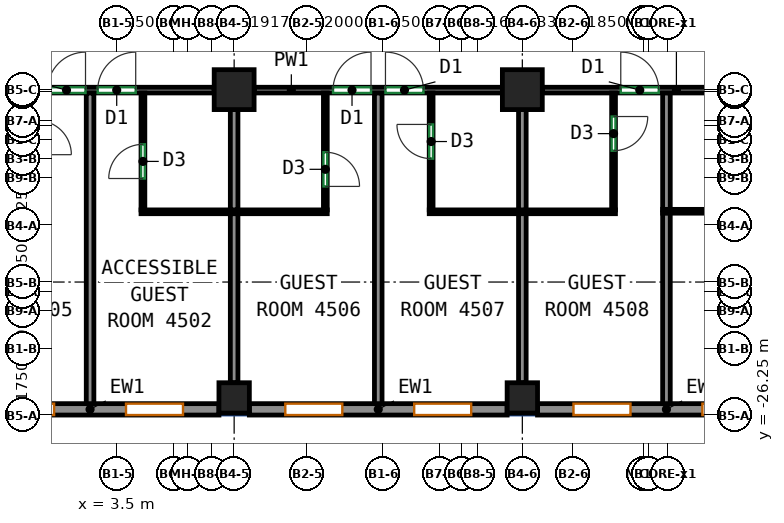
"""IFC4 building model, lengths in metres.
Left out: names, types, materials, properties, quantities, classifications, styles, units other than length and angle.
Written with IfcOpenShell. Run it as: python <this file> out.ifc"""

import sys

from ifc_helpers import new_model, si_unit, direction, frame, frame_2d, origin, origin_2d, place, context, subcontext, project, spatial, rectangle, extrude, source, transform, mapped, element, fill, save


model = new_model("IFC4")
c1 = context("Model", 3, precision=1e-05, world=origin(), true_north=direction((0.0, 1.0)))
c2 = subcontext(c1, "Body", "Model", "MODEL_VIEW")
j1 = project(units=[si_unit("LENGTHUNIT", "METRE"), si_unit("PLANEANGLEUNIT", "RADIAN")], contexts=[c1])
p1 = place(None, origin())
s1 = spatial("IfcSite", under=j1, at=p1, CompositionType="ELEMENT")
p2 = place(p1, origin())
s2 = spatial("IfcBuilding", under=s1, at=p2, CompositionType="ELEMENT")
p3 = place(p2, frame((0.0, 0.0, 188.9)))
s3 = spatial("IfcBuildingStorey", under=s2, at=p3, CompositionType="ELEMENT", Elevation=188.9)
m1 = source(origin(), c2, "Body", "SweptSolid", [
    extrude(rectangle(XDim=0.8, YDim=0.8, at=origin_2d()), origin(), (0.0, 0.0, 1.0), 3.12),
])
p4 = place(p3, frame((6.583, -25.8, 0.0), z_axis=(0.0, 0.0, 1.0), x_axis=(1.0, 0.0, 0.0)))
e1 = element("IfcColumn", 1, at=p4, inside=s3, PredefinedType="COLUMN", context=c2, shape_type="MappedRepresentation", body=[
    mapped(m1, transform((0.0, 0.0, 0.0))),
])
m2 = source(origin(), c2, "Body", "SweptSolid", [
    extrude(rectangle(XDim=1.05, YDim=1.05, at=origin_2d()), origin(), (0.0, 0.0, 1.0), 3.12),
])
p5 = place(p3, frame((6.583, -17.688, 0.0), z_axis=(0.0, 0.0, 1.0), x_axis=(1.0, 0.0, 0.0)))
e2 = element("IfcColumn", 2, at=p5, inside=s3, PredefinedType="COLUMN", context=c2, shape_type="MappedRepresentation", body=[
    mapped(m2, transform((0.0, 0.0, 0.0))),
])
p6 = place(p3, frame((14.167, -25.8, 0.0), z_axis=(0.0, 0.0, 1.0), x_axis=(1.0, 0.0, 0.0)))
e3 = element("IfcColumn", 3, at=p6, inside=s3, PredefinedType="COLUMN", context=c2, shape_type="MappedRepresentation", body=[
    mapped(m1, transform((0.0, 0.0, 0.0))),
])
p7 = place(p3, frame((14.167, -17.688, 0.0), z_axis=(0.0, 0.0, 1.0), x_axis=(1.0, 0.0, 0.0)))
e4 = element("IfcColumn", 4, at=p7, inside=s3, PredefinedType="COLUMN", context=c2, shape_type="MappedRepresentation", body=[
    mapped(m2, transform((0.0, 0.0, 0.0))),
])
m3 = source(origin(), c2, "Body", "SweptSolid", [
    extrude(rectangle(XDim=6.783, YDim=0.3, at=frame_2d((3.392, 0.0))), origin(), (0.0, 0.0, 1.0), 3.12),
])
p8 = place(p3, frame((-0.6, -26.1, 0.0), z_axis=(0.0, 0.0, 1.0), x_axis=(1.0, 0.0, 0.0)))
e5 = element("IfcWall", 5, at=p8, inside=s3, PredefinedType="SOLIDWALL", context=c2, shape_type="MappedRepresentation", body=[
    mapped(m3, transform((0.0, 0.0, 0.0))),
])
p9 = place(p8, frame((0.946, 0.0, 0.85)))
e6 = element("IfcOpeningElement", 6, at=p9, cuts=e5, PredefinedType="OPENING", context=c2, shape_type="SweptSolid", body=[
    extrude(rectangle(XDim=1.5, YDim=1.95, at=frame_2d((0.75, 0.975))), frame((0.0, 0.16, 0.0), z_axis=(0.0, -1.0, 0.0), x_axis=(1.0, 0.0, 0.0)), (0.0, 0.0, 1.0), 0.32),
])
p10 = place(p8, frame((4.337, 0.0, 0.85)))
e7 = element("IfcOpeningElement", 7, at=p10, cuts=e5, PredefinedType="OPENING", context=c2, shape_type="SweptSolid", body=[
    extrude(rectangle(XDim=1.5, YDim=1.95, at=frame_2d((0.75, 0.975))), frame((0.0, 0.16, 0.0), z_axis=(0.0, -1.0, 0.0), x_axis=(1.0, 0.0, 0.0)), (0.0, 0.0, 1.0), 0.32),
])
m4 = source(origin(), c2, "Body", "SweptSolid", [
    extrude(rectangle(XDim=6.783, YDim=0.3, at=frame_2d((3.392, 0.0))), origin(), (0.0, 0.0, 1.0), 3.12),
])
p11 = place(p3, frame((6.983, -26.1, 0.0), z_axis=(0.0, 0.0, 1.0), x_axis=(1.0, 0.0, 0.0)))
e8 = element("IfcWall", 8, at=p11, inside=s3, PredefinedType="SOLIDWALL", context=c2, shape_type="MappedRepresentation", body=[
    mapped(m4, transform((0.0, 0.0, 0.0))),
])
p12 = place(p11, frame((0.946, 0.0, 0.85)))
e9 = element("IfcOpeningElement", 9, at=p12, cuts=e8, PredefinedType="OPENING", context=c2, shape_type="SweptSolid", body=[
    extrude(rectangle(XDim=1.5, YDim=1.95, at=frame_2d((0.75, 0.975))), frame((0.0, 0.16, 0.0), z_axis=(0.0, -1.0, 0.0), x_axis=(1.0, 0.0, 0.0)), (0.0, 0.0, 1.0), 0.32),
])
p13 = place(p11, frame((4.338, 0.0, 0.85)))
e10 = element("IfcOpeningElement", 10, at=p13, cuts=e8, PredefinedType="OPENING", context=c2, shape_type="SweptSolid", body=[
    extrude(rectangle(XDim=1.5, YDim=1.95, at=frame_2d((0.75, 0.975))), frame((0.0, 0.16, 0.0), z_axis=(0.0, -1.0, 0.0), x_axis=(1.0, 0.0, 0.0)), (0.0, 0.0, 1.0), 0.32),
])
p14 = place(p3, frame((14.567, -26.1, 0.0), z_axis=(0.0, 0.0, 1.0), x_axis=(1.0, 0.0, 0.0)))
e11 = element("IfcWall", 11, at=p14, inside=s3, PredefinedType="SOLIDWALL", context=c2, shape_type="MappedRepresentation", body=[
    mapped(m3, transform((0.0, 0.0, 0.0))),
])
p15 = place(p14, frame((0.946, 0.0, 0.85)))
e12 = element("IfcOpeningElement", 12, at=p15, cuts=e11, PredefinedType="OPENING", context=c2, shape_type="SweptSolid", body=[
    extrude(rectangle(XDim=1.5, YDim=1.95, at=frame_2d((0.75, 0.975))), frame((0.0, 0.16, 0.0), z_axis=(0.0, -1.0, 0.0), x_axis=(1.0, 0.0, 0.0)), (0.0, 0.0, 1.0), 0.32),
])
p16 = place(p14, frame((4.337, 0.0, 0.85)))
e13 = element("IfcOpeningElement", 13, at=p16, cuts=e11, PredefinedType="OPENING", context=c2, shape_type="SweptSolid", body=[
    extrude(rectangle(XDim=1.5, YDim=1.95, at=frame_2d((0.75, 0.975))), frame((0.0, 0.16, 0.0), z_axis=(0.0, -1.0, 0.0), x_axis=(1.0, 0.0, 0.0)), (0.0, 0.0, 1.0), 0.32),
])
p17 = place(p3, frame((-0.475, -17.7, 0.0), z_axis=(0.0, 0.0, 1.0), x_axis=(1.0, 0.0, 0.0)))
e14 = element("IfcWall", 14, at=p17, inside=s3, PredefinedType="PARTITIONING", context=c2, shape_type="SweptSolid", body=[
    extrude(rectangle(XDim=6.533, YDim=0.15, at=frame_2d((3.267, 0.0))), origin(), (0.0, 0.0, 1.0), 3.12),
])
p18 = place(p17, frame((2.147, 0.0, 0.0)))
e15 = element("IfcOpeningElement", 15, at=p18, cuts=e14, PredefinedType="OPENING", context=c2, shape_type="SweptSolid", body=[
    extrude(rectangle(XDim=1.0, YDim=2.1, at=frame_2d((0.5, 1.05))), frame((0.0, 0.085, 0.0), z_axis=(0.0, -1.0, 0.0), x_axis=(1.0, 0.0, 0.0)), (0.0, 0.0, 1.0), 0.17),
])
p19 = place(p17, frame((3.468, 0.0, 0.0)))
e16 = element("IfcOpeningElement", 16, at=p19, cuts=e14, PredefinedType="OPENING", context=c2, shape_type="SweptSolid", body=[
    extrude(rectangle(XDim=1.0, YDim=2.1, at=frame_2d((0.5, 1.05))), frame((0.0, 0.085, 0.0), z_axis=(0.0, -1.0, 0.0), x_axis=(1.0, 0.0, 0.0)), (0.0, 0.0, 1.0), 0.17),
])
p20 = place(p3, frame((7.108, -17.7, 0.0), z_axis=(0.0, 0.0, 1.0), x_axis=(1.0, 0.0, 0.0)))
e17 = element("IfcWall", 17, at=p20, inside=s3, PredefinedType="PARTITIONING", context=c2, shape_type="SweptSolid", body=[
    extrude(rectangle(XDim=6.534, YDim=0.15, at=frame_2d((3.267, 0.0))), origin(), (0.0, 0.0, 1.0), 3.12),
])
p21 = place(p20, frame((2.077, 0.0, 0.0)))
e18 = element("IfcOpeningElement", 18, at=p21, cuts=e17, PredefinedType="OPENING", context=c2, shape_type="SweptSolid", body=[
    extrude(rectangle(XDim=1.0, YDim=2.1, at=frame_2d((0.5, 1.05))), frame((0.0, 0.085, 0.0), z_axis=(0.0, -1.0, 0.0), x_axis=(1.0, 0.0, 0.0)), (0.0, 0.0, 1.0), 0.17),
])
p22 = place(p20, frame((3.457, 0.0, 0.0)))
e19 = element("IfcOpeningElement", 19, at=p22, cuts=e17, PredefinedType="OPENING", context=c2, shape_type="SweptSolid", body=[
    extrude(rectangle(XDim=1.0, YDim=2.1, at=frame_2d((0.5, 1.05))), frame((0.0, 0.085, 0.0), z_axis=(0.0, -1.0, 0.0), x_axis=(1.0, 0.0, 0.0)), (0.0, 0.0, 1.0), 0.17),
])
p23 = place(p3, frame((14.692, -17.7, 0.0), z_axis=(0.0, 0.0, 1.0), x_axis=(1.0, 0.0, 0.0)))
e20 = element("IfcWall", 20, at=p23, inside=s3, PredefinedType="PARTITIONING", context=c2, shape_type="SweptSolid", body=[
    extrude(rectangle(XDim=7.058, YDim=0.15, at=frame_2d((3.529, 0.0))), origin(), (0.0, 0.0, 1.0), 2.52),
])
p24 = place(p23, frame((2.065, 0.0, 0.0)))
e21 = element("IfcOpeningElement", 21, at=p24, cuts=e20, PredefinedType="OPENING", context=c2, shape_type="SweptSolid", body=[
    extrude(rectangle(XDim=1.0, YDim=2.1, at=frame_2d((0.5, 1.05))), frame((0.0, 0.085, 0.0), z_axis=(0.0, -1.0, 0.0), x_axis=(1.0, 0.0, 0.0)), (0.0, 0.0, 1.0), 0.17),
])
p25 = place(p23, frame((5.858, 0.0, 0.0)))
e22 = element("IfcOpeningElement", 22, at=p25, cuts=e20, PredefinedType="OPENING", context=c2, shape_type="SweptSolid", body=[
    extrude(rectangle(XDim=1.0, YDim=2.1, at=frame_2d((0.5, 1.05))), frame((0.0, 0.085, 0.0), z_axis=(0.0, -1.0, 0.0), x_axis=(1.0, 0.0, 0.0)), (0.0, 0.0, 1.0), 0.17),
])
p26 = place(p3, frame((2.792, -26.0, 0.0), z_axis=(0.0, 0.0, 1.0), x_axis=(0.0, 1.0, 0.0)))
e23 = element("IfcWall", 23, at=p26, inside=s3, PredefinedType="PARTITIONING", context=c2, shape_type="SweptSolid", body=[
    extrude(rectangle(XDim=8.223, YDim=0.2, at=frame_2d((4.111, 0.0))), origin(), (0.0, 0.0, 1.0), 3.12),
])
p27 = place(p3, frame((4.183, -20.852, 0.0), z_axis=(0.0, 0.0, 1.0), x_axis=(0.0, 1.0, 0.0)))
e24 = element("IfcWall", 24, at=p27, inside=s3, PredefinedType="PARTITIONING", context=c2, shape_type="SweptSolid", body=[
    extrude(rectangle(XDim=3.075, YDim=0.1, at=frame_2d((1.538, 0.0))), origin(), (0.0, 0.0, 1.0), 3.12),
])
p28 = place(p27, frame((0.826, 0.0, 0.0)))
e25 = element("IfcOpeningElement", 25, at=p28, cuts=e24, PredefinedType="OPENING", context=c2, shape_type="SweptSolid", body=[
    extrude(rectangle(XDim=0.9, YDim=2.1, at=frame_2d((0.45, 1.05))), frame((0.0, 0.06, 0.0), z_axis=(0.0, -1.0, 0.0), x_axis=(1.0, 0.0, 0.0)), (0.0, 0.0, 1.0), 0.12),
])
p29 = place(p3, frame((4.133, -20.902, 0.0), z_axis=(0.0, 0.0, 1.0), x_axis=(1.0, 0.0, 0.0)))
e26 = element("IfcWall", 26, at=p29, inside=s3, PredefinedType="PARTITIONING", context=c2, shape_type="SweptSolid", body=[
    extrude(rectangle(XDim=4.9, YDim=0.1, at=frame_2d((2.45, 0.0))), origin(), (0.0, 0.0, 1.0), 3.12),
])
p30 = place(p3, frame((6.583, -25.4, 0.0), z_axis=(0.0, 0.0, 1.0), x_axis=(0.0, 1.0, 0.0)))
e27 = element("IfcWall", 27, at=p30, inside=s3, PredefinedType="PARTITIONING", context=c2, shape_type="SweptSolid", body=[
    extrude(rectangle(XDim=4.448, YDim=0.2, at=frame_2d((2.224, 0.0))), origin(), (0.0, 0.0, 1.0), 3.12),
])
p31 = place(p3, frame((6.583, -20.852, 0.0), z_axis=(0.0, 0.0, 1.0), x_axis=(0.0, 1.0, 0.0)))
e28 = element("IfcWall", 28, at=p31, inside=s3, PredefinedType="PARTITIONING", context=c2, shape_type="SweptSolid", body=[
    extrude(rectangle(XDim=2.64, YDim=0.2, at=frame_2d((1.32, 0.0))), origin(), (0.0, 0.0, 1.0), 3.12),
])
p32 = place(p3, frame((8.983, -17.777, 0.0), z_axis=(0.0, 0.0, 1.0), x_axis=(0.0, -1.0, 0.0)))
e29 = element("IfcWall", 29, at=p32, inside=s3, PredefinedType="PARTITIONING", context=c2, shape_type="SweptSolid", body=[
    extrude(rectangle(XDim=3.075, YDim=0.1, at=frame_2d((1.538, 0.0))), origin(), (0.0, 0.0, 1.0), 3.12),
])
p33 = place(p32, frame((1.557, 0.0, 0.0)))
e30 = element("IfcOpeningElement", 30, at=p33, cuts=e29, PredefinedType="OPENING", context=c2, shape_type="SweptSolid", body=[
    extrude(rectangle(XDim=0.9, YDim=2.1, at=frame_2d((0.45, 1.05))), frame((0.0, 0.06, 0.0), z_axis=(0.0, -1.0, 0.0), x_axis=(1.0, 0.0, 0.0)), (0.0, 0.0, 1.0), 0.12),
])
p34 = place(p3, frame((10.375, -26.0, 0.0), z_axis=(0.0, 0.0, 1.0), x_axis=(0.0, 1.0, 0.0)))
e31 = element("IfcWall", 31, at=p34, inside=s3, PredefinedType="PARTITIONING", context=c2, shape_type="SweptSolid", body=[
    extrude(rectangle(XDim=8.223, YDim=0.2, at=frame_2d((4.111, 0.0))), origin(), (0.0, 0.0, 1.0), 3.12),
])
p35 = place(p3, frame((11.767, -20.852, 0.0), z_axis=(0.0, 0.0, 1.0), x_axis=(0.0, 1.0, 0.0)))
e32 = element("IfcWall", 32, at=p35, inside=s3, PredefinedType="PARTITIONING", context=c2, shape_type="SweptSolid", body=[
    extrude(rectangle(XDim=3.075, YDim=0.1, at=frame_2d((1.538, 0.0))), origin(), (0.0, 0.0, 1.0), 3.12),
])
p36 = place(p35, frame((1.349, 0.0, 0.0)))
e33 = element("IfcOpeningElement", 33, at=p36, cuts=e32, PredefinedType="OPENING", context=c2, shape_type="SweptSolid", body=[
    extrude(rectangle(XDim=0.9, YDim=2.1, at=frame_2d((0.45, 1.05))), frame((0.0, 0.06, 0.0), z_axis=(0.0, -1.0, 0.0), x_axis=(1.0, 0.0, 0.0)), (0.0, 0.0, 1.0), 0.12),
])
p37 = place(p3, frame((11.717, -20.902, 0.0), z_axis=(0.0, 0.0, 1.0), x_axis=(1.0, 0.0, 0.0)))
e34 = element("IfcWall", 34, at=p37, inside=s3, PredefinedType="PARTITIONING", context=c2, shape_type="SweptSolid", body=[
    extrude(rectangle(XDim=4.9, YDim=0.1, at=frame_2d((2.45, 0.0))), origin(), (0.0, 0.0, 1.0), 3.12),
])
p38 = place(p3, frame((14.167, -25.4, 0.0), z_axis=(0.0, 0.0, 1.0), x_axis=(0.0, 1.0, 0.0)))
e35 = element("IfcWall", 35, at=p38, inside=s3, PredefinedType="PARTITIONING", context=c2, shape_type="SweptSolid", body=[
    extrude(rectangle(XDim=4.448, YDim=0.2, at=frame_2d((2.224, 0.0))), origin(), (0.0, 0.0, 1.0), 3.12),
])
p39 = place(p3, frame((14.167, -20.852, 0.0), z_axis=(0.0, 0.0, 1.0), x_axis=(0.0, 1.0, 0.0)))
e36 = element("IfcWall", 36, at=p39, inside=s3, PredefinedType="PARTITIONING", context=c2, shape_type="SweptSolid", body=[
    extrude(rectangle(XDim=2.64, YDim=0.2, at=frame_2d((1.32, 0.0))), origin(), (0.0, 0.0, 1.0), 3.12),
])
p40 = place(p3, frame((16.567, -17.777, 0.0), z_axis=(0.0, 0.0, 1.0), x_axis=(0.0, -1.0, 0.0)))
e37 = element("IfcWall", 37, at=p40, inside=s3, PredefinedType="PARTITIONING", context=c2, shape_type="SweptSolid", body=[
    extrude(rectangle(XDim=3.075, YDim=0.1, at=frame_2d((1.538, 0.0))), origin(), (0.0, 0.0, 1.0), 3.12),
])
p41 = place(p40, frame((0.618, 0.0, 0.0)))
e38 = element("IfcOpeningElement", 38, at=p41, cuts=e37, PredefinedType="OPENING", context=c2, shape_type="SweptSolid", body=[
    extrude(rectangle(XDim=0.9, YDim=2.1, at=frame_2d((0.45, 1.05))), frame((0.0, 0.06, 0.0), z_axis=(0.0, -1.0, 0.0), x_axis=(1.0, 0.0, 0.0)), (0.0, 0.0, 1.0), 0.12),
])
p42 = place(p3, frame((17.959, -26.0, 0.0), z_axis=(0.0, 0.0, 1.0), x_axis=(0.0, 1.0, 0.0)))
e39 = element("IfcWall", 39, at=p42, inside=s3, PredefinedType="PARTITIONING", context=c2, shape_type="SweptSolid", body=[
    extrude(rectangle(XDim=5.072, YDim=0.2, at=frame_2d((2.536, 0.0))), origin(), (0.0, 0.0, 1.0), 3.12),
])
p43 = place(p3, frame((17.959, -20.848, 0.0), z_axis=(0.0, 0.0, 1.0), x_axis=(0.0, 1.0, 0.0)))
e40 = element("IfcWall", 40, at=p43, inside=s3, PredefinedType="PARTITIONING", context=c2, shape_type="SweptSolid", body=[
    extrude(rectangle(XDim=3.071, YDim=0.2, at=frame_2d((1.535, 0.0))), origin(), (0.0, 0.0, 1.0), 3.12),
])
p44 = place(p3, frame((17.859, -20.888, 0.0), z_axis=(0.0, 0.0, 1.0), x_axis=(1.0, 0.0, 0.0)))
e41 = element("IfcWall", 41, at=p44, inside=s3, PredefinedType="PARTITIONING", context=c2, shape_type="SweptSolid", body=[
    extrude(rectangle(XDim=2.55, YDim=0.1, at=frame_2d((1.275, 0.0))), origin(), (0.0, 0.0, 1.0), 3.12),
])
p45 = place(p9, origin())
e42 = element("IfcWindow", 42, at=p45, inside=s3, PartitioningType="SINGLE_PANEL", PredefinedType="WINDOW", context=c2, shape_type="SweptSolid", body=[
    extrude(rectangle(XDim=1.5, YDim=1.95, at=frame_2d((0.75, 0.975))), frame((0.0, 0.03, 0.0), z_axis=(0.0, -1.0, 0.0), x_axis=(1.0, 0.0, 0.0)), (0.0, 0.0, 1.0), 0.06),
])
fill(e6, e42)
p46 = place(p10, origin())
e43 = element("IfcWindow", 43, at=p46, inside=s3, PartitioningType="SINGLE_PANEL", PredefinedType="WINDOW", context=c2, shape_type="SweptSolid", body=[
    extrude(rectangle(XDim=1.5, YDim=1.95, at=frame_2d((0.75, 0.975))), frame((0.0, 0.03, 0.0), z_axis=(0.0, -1.0, 0.0), x_axis=(1.0, 0.0, 0.0)), (0.0, 0.0, 1.0), 0.06),
])
fill(e7, e43)
p47 = place(p12, origin())
e44 = element("IfcWindow", 44, at=p47, inside=s3, PartitioningType="SINGLE_PANEL", PredefinedType="WINDOW", context=c2, shape_type="SweptSolid", body=[
    extrude(rectangle(XDim=1.5, YDim=1.95, at=frame_2d((0.75, 0.975))), frame((0.0, 0.03, 0.0), z_axis=(0.0, -1.0, 0.0), x_axis=(1.0, 0.0, 0.0)), (0.0, 0.0, 1.0), 0.06),
])
fill(e9, e44)
p48 = place(p13, origin())
e45 = element("IfcWindow", 45, at=p48, inside=s3, PartitioningType="SINGLE_PANEL", PredefinedType="WINDOW", context=c2, shape_type="SweptSolid", body=[
    extrude(rectangle(XDim=1.5, YDim=1.95, at=frame_2d((0.75, 0.975))), frame((0.0, 0.03, 0.0), z_axis=(0.0, -1.0, 0.0), x_axis=(1.0, 0.0, 0.0)), (0.0, 0.0, 1.0), 0.06),
])
fill(e10, e45)
p49 = place(p15, origin())
e46 = element("IfcWindow", 46, at=p49, inside=s3, PartitioningType="SINGLE_PANEL", PredefinedType="WINDOW", context=c2, shape_type="SweptSolid", body=[
    extrude(rectangle(XDim=1.5, YDim=1.95, at=frame_2d((0.75, 0.975))), frame((0.0, 0.03, 0.0), z_axis=(0.0, -1.0, 0.0), x_axis=(1.0, 0.0, 0.0)), (0.0, 0.0, 1.0), 0.06),
])
fill(e12, e46)
p50 = place(p16, origin())
e47 = element("IfcWindow", 47, at=p50, inside=s3, PartitioningType="SINGLE_PANEL", PredefinedType="WINDOW", context=c2, shape_type="SweptSolid", body=[
    extrude(rectangle(XDim=1.5, YDim=1.95, at=frame_2d((0.75, 0.975))), frame((0.0, 0.03, 0.0), z_axis=(0.0, -1.0, 0.0), x_axis=(1.0, 0.0, 0.0)), (0.0, 0.0, 1.0), 0.06),
])
fill(e13, e47)
p51 = place(p33, origin())
e48 = element("IfcDoor", 48, at=p51, inside=s3, OperationType="SINGLE_SWING_RIGHT", PredefinedType="DOOR", context=c2, shape_type="SweptSolid", body=[
    extrude(rectangle(XDim=0.9, YDim=2.1, at=frame_2d((0.45, 1.05))), frame((0.0, 0.025, 0.0), z_axis=(0.0, -1.0, 0.0), x_axis=(1.0, 0.0, 0.0)), (0.0, 0.0, 1.0), 0.05),
])
fill(e30, e48)
p52 = place(p28, origin())
e49 = element("IfcDoor", 49, at=p52, inside=s3, OperationType="SINGLE_SWING_LEFT", PredefinedType="DOOR", context=c2, shape_type="SweptSolid", body=[
    extrude(rectangle(XDim=0.9, YDim=2.1, at=frame_2d((0.45, 1.05))), frame((0.0, 0.025, 0.0), z_axis=(0.0, -1.0, 0.0), x_axis=(1.0, 0.0, 0.0)), (0.0, 0.0, 1.0), 0.05),
])
fill(e25, e49)
p53 = place(p36, origin())
e50 = element("IfcDoor", 50, at=p53, inside=s3, OperationType="SINGLE_SWING_RIGHT", PredefinedType="DOOR", context=c2, shape_type="SweptSolid", body=[
    extrude(rectangle(XDim=0.9, YDim=2.1, at=frame_2d((0.45, 1.05))), frame((0.0, 0.025, 0.0), z_axis=(0.0, -1.0, 0.0), x_axis=(1.0, 0.0, 0.0)), (0.0, 0.0, 1.0), 0.05),
])
fill(e33, e50)
p54 = place(p41, origin())
e51 = element("IfcDoor", 51, at=p54, inside=s3, OperationType="SINGLE_SWING_LEFT", PredefinedType="DOOR", context=c2, shape_type="SweptSolid", body=[
    extrude(rectangle(XDim=0.9, YDim=2.1, at=frame_2d((0.45, 1.05))), frame((0.0, 0.025, 0.0), z_axis=(0.0, -1.0, 0.0), x_axis=(1.0, 0.0, 0.0)), (0.0, 0.0, 1.0), 0.05),
])
fill(e38, e51)
p55 = place(p18, origin())
e52 = element("IfcDoor", 52, at=p55, inside=s3, OperationType="SINGLE_SWING_RIGHT", PredefinedType="DOOR", context=c2, shape_type="SweptSolid", body=[
    extrude(rectangle(XDim=1.0, YDim=2.1, at=frame_2d((0.5, 1.05))), frame((0.0, 0.025, 0.0), z_axis=(0.0, -1.0, 0.0), x_axis=(1.0, 0.0, 0.0)), (0.0, 0.0, 1.0), 0.05),
])
fill(e15, e52)
p56 = place(p19, origin())
e53 = element("IfcDoor", 53, at=p56, inside=s3, OperationType="SINGLE_SWING_RIGHT", PredefinedType="DOOR", context=c2, shape_type="SweptSolid", body=[
    extrude(rectangle(XDim=1.0, YDim=2.1, at=frame_2d((0.5, 1.05))), frame((0.0, 0.025, 0.0), z_axis=(0.0, -1.0, 0.0), x_axis=(1.0, 0.0, 0.0)), (0.0, 0.0, 1.0), 0.05),
])
fill(e16, e53)
p57 = place(p21, origin())
e54 = element("IfcDoor", 54, at=p57, inside=s3, OperationType="SINGLE_SWING_RIGHT", PredefinedType="DOOR", context=c2, shape_type="SweptSolid", body=[
    extrude(rectangle(XDim=1.0, YDim=2.1, at=frame_2d((0.5, 1.05))), frame((0.0, 0.025, 0.0), z_axis=(0.0, -1.0, 0.0), x_axis=(1.0, 0.0, 0.0)), (0.0, 0.0, 1.0), 0.05),
])
fill(e18, e54)
p58 = place(p22, origin())
e55 = element("IfcDoor", 55, at=p58, inside=s3, OperationType="SINGLE_SWING_LEFT", PredefinedType="DOOR", context=c2, shape_type="SweptSolid", body=[
    extrude(rectangle(XDim=1.0, YDim=2.1, at=frame_2d((0.5, 1.05))), frame((0.0, 0.025, 0.0), z_axis=(0.0, -1.0, 0.0), x_axis=(1.0, 0.0, 0.0)), (0.0, 0.0, 1.0), 0.05),
])
fill(e19, e55)
p59 = place(p24, origin())
e56 = element("IfcDoor", 56, at=p59, inside=s3, OperationType="SINGLE_SWING_LEFT", PredefinedType="DOOR", context=c2, shape_type="SweptSolid", body=[
    extrude(rectangle(XDim=1.0, YDim=2.1, at=frame_2d((0.5, 1.05))), frame((0.0, 0.025, 0.0), z_axis=(0.0, -1.0, 0.0), x_axis=(1.0, 0.0, 0.0)), (0.0, 0.0, 1.0), 0.05),
])
fill(e21, e56)
save(model, sys.argv[1])
